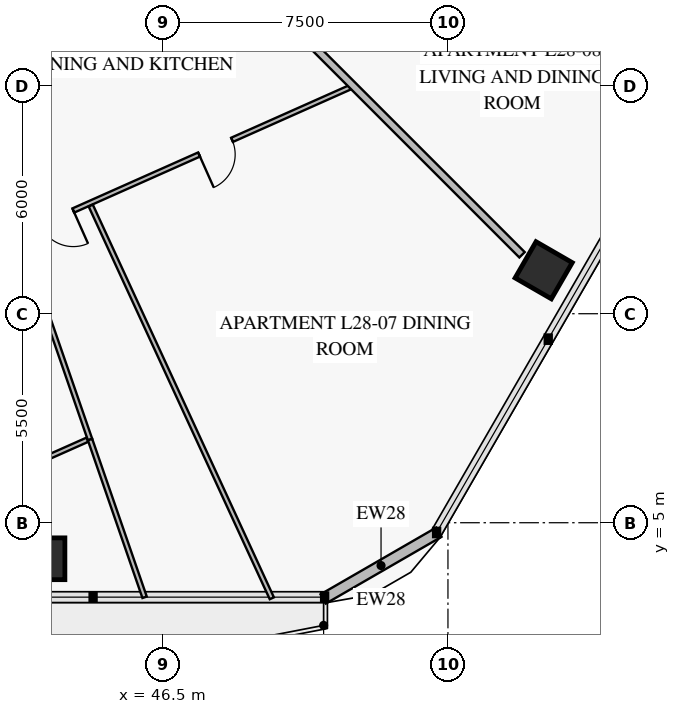
"""IFC4 building model, lengths in metres.
Left out: names, types, materials, properties, quantities, classifications, styles, units other than length and angle.
Written with IfcOpenShell. Run it as: python <this file> out.ifc"""

import sys

from ifc_helpers import new_model, si_unit, direction, frame, frame_2d, origin, origin_2d, place, context, subcontext, project, spatial, rectangle, extrude, element, fill, save


model = new_model("IFC4")
c1 = context("Model", 3, precision=1e-05, world=origin(), true_north=direction((0.0, 1.0)))
c2 = subcontext(c1, "Body", "Model", "MODEL_VIEW")
j1 = project(units=[si_unit("LENGTHUNIT", "METRE"), si_unit("PLANEANGLEUNIT", "RADIAN")], contexts=[c1])
p1 = place(None, origin())
s1 = spatial("IfcSite", under=j1, at=p1, CompositionType="ELEMENT")
p2 = place(p1, origin())
s2 = spatial("IfcBuilding", under=s1, at=p2, CompositionType="ELEMENT")
p3 = place(p2, frame((0.0, 0.0, 115.2)))
s3 = spatial("IfcBuildingStorey", under=s2, at=p3, CompositionType="ELEMENT", Elevation=115.2)
for number, where, z_axis, x_axis in (
    (1, (43.37, 4.052, 0.0), (0.0, 0.0, 1.0), (1.0, 0.0, 0.0)),
    (2, (56.519, 11.643, 0.0), (0.0, 0.0, 1.0), (0.5, 0.866, 0.0)),
):
    element("IfcColumn", number, at=place(p3, frame(where, z_axis=z_axis, x_axis=x_axis)), inside=s3, PredefinedType="COLUMN", context=c2, shape_type="SweptSolid", body=[
        extrude(rectangle(XDim=1.1, YDim=1.1, at=origin_2d()), origin(), (0.0, 0.0, 1.0), 3.55),
    ])
p4 = place(p3, frame((53.761, 4.751, 0.0), z_axis=(0.0, 0.0, 1.0), x_axis=(-0.866007452331, -0.500031091541, 0.0)))
e3 = element("IfcWall", 3, at=p4, inside=s3, PredefinedType="SOLIDWALL", context=c2, shape_type="SweptSolid", body=[
    extrude(rectangle(XDim=3.515, YDim=0.28, at=frame_2d((1.757, 0.0))), origin(), (0.0, 0.0, 1.0), 3.55),
])
p5 = place(p3, frame((42.625, 12.541, 0.0), z_axis=(0.0, 0.0, 1.0), x_axis=(0.913542487884, 0.406743313198, 0.0)))
e4 = element("IfcWall", 4, at=p5, inside=s3, PredefinedType="PARTITIONING", context=c2, shape_type="SweptSolid", body=[
    extrude(rectangle(XDim=9.624, YDim=0.12, at=frame_2d((4.812, 0.0))), origin(), (0.0, 0.0, 1.0), 3.1),
])
p6 = place(p5, frame((0.711, 0.0, 0.0)))
e5 = element("IfcOpeningElement", 5, at=p6, cuts=e4, PredefinedType="OPENING", context=c2, shape_type="SweptSolid", body=[
    extrude(rectangle(XDim=0.95, YDim=2.1, at=frame_2d((0.475, 1.05))), frame((0.0, 0.072, 0.0), z_axis=(0.0, -1.0, 0.0), x_axis=(1.0, 0.0, 0.0)), (0.0, 0.0, 1.0), 0.144),
])
p7 = place(p5, frame((5.282, 0.0, 0.0)))
e6 = element("IfcOpeningElement", 6, at=p7, cuts=e4, PredefinedType="OPENING", context=c2, shape_type="SweptSolid", body=[
    extrude(rectangle(XDim=0.95, YDim=2.1, at=frame_2d((0.475, 1.05))), frame((0.0, 0.072, 0.0), z_axis=(0.0, -1.0, 0.0), x_axis=(1.0, 0.0, 0.0)), (0.0, 0.0, 1.0), 0.144),
])
p8 = place(p3, frame((42.739, 12.517, 0.0), z_axis=(0.0, 0.0, 1.0), x_axis=(0.32689789909, -0.945059661382, 0.0)))
e7 = element("IfcWall", 7, at=p8, inside=s3, PredefinedType="PARTITIONING", context=c2, shape_type="SweptSolid", body=[
    extrude(rectangle(XDim=5.639, YDim=0.12, at=frame_2d((2.819, 0.0))), origin(), (0.0, 0.0, 1.0), 3.55),
])
p9 = place(p3, frame((37.606, 4.109, 0.0), z_axis=(0.0, 0.0, 1.0), x_axis=(0.913547663518, 0.406731688562, 0.0)))
e8 = element("IfcWall", 8, at=p9, inside=s3, PredefinedType="PARTITIONING", context=c2, shape_type="SweptSolid", body=[
    extrude(rectangle(XDim=7.56, YDim=0.12, at=frame_2d((3.78, 0.0))), origin(), (0.0, 0.0, 1.0), 2.8),
])
p10 = place(p9, frame((3.389, 0.0, 0.0)))
e9 = element("IfcOpeningElement", 9, at=p10, cuts=e8, PredefinedType="OPENING", context=c2, shape_type="SweptSolid", body=[
    extrude(rectangle(XDim=0.95, YDim=2.1, at=frame_2d((0.475, 1.05))), frame((0.0, 0.072, 0.0), z_axis=(0.0, -1.0, 0.0), x_axis=(1.0, 0.0, 0.0)), (0.0, 0.0, 1.0), 0.144),
])
p11 = place(p3, frame((44.601, 13.346, 0.0), z_axis=(0.0, 0.0, 1.0), x_axis=(0.418713944569, -0.90811818208, 0.0)))
e10 = element("IfcWall", 10, at=p11, inside=s3, PredefinedType="PARTITIONING", context=c2, shape_type="SweptSolid", body=[
    extrude(rectangle(XDim=11.38, YDim=0.12, at=frame_2d((5.69, 0.0))), origin(), (0.0, 0.0, 1.0), 2.8),
])
p12 = place(p3, frame((44.582, 7.188, 0.0), z_axis=(0.0, 0.0, 1.0), x_axis=(0.326848948983, -0.945076591896, 0.0)))
e11 = element("IfcWall", 11, at=p12, inside=s3, PredefinedType="PARTITIONING", context=c2, shape_type="SweptSolid", body=[
    extrude(rectangle(XDim=4.391, YDim=0.12, at=frame_2d((2.196, 0.0))), origin(), (0.0, 0.0, 1.0), 2.8),
])
p13 = place(p3, frame((48.04, 19.96, 0.0), z_axis=(0.0, 0.0, 1.0), x_axis=(0.707106781187, -0.707106781187, 0.0)))
e12 = element("IfcWall", 12, at=p13, inside=s3, PredefinedType="PARTITIONING", context=c2, shape_type="SweptSolid", body=[
    extrude(rectangle(XDim=11.185, YDim=0.2, at=frame_2d((5.592, 0.0))), origin(), (0.0, 0.0, 1.0), 2.85),
])
p14 = place(p3, frame((51.936, 22.356, 0.0), z_axis=(0.0, 0.0, 1.0), x_axis=(0.855542431798, -0.517732698786, 0.0)))
e13 = element("IfcWall", 13, at=p14, inside=s3, PredefinedType="PARTITIONING", context=c2, shape_type="SweptSolid", body=[
    extrude(rectangle(XDim=10.348, YDim=0.12, at=frame_2d((5.174, 0.0))), origin(), (0.0, 0.0, 1.0), 2.8),
])
p15 = place(p6, frame((0.95, 0.0, 0.0), z_axis=(0.0, 0.0, 1.0), x_axis=(-1.0, 0.0, 0.0)))
e14 = element("IfcDoor", 14, at=p15, inside=s3, OperationType="SINGLE_SWING_LEFT", PredefinedType="DOOR", context=c2, shape_type="SweptSolid", body=[
    extrude(rectangle(XDim=0.95, YDim=2.1, at=frame_2d((0.475, 1.05))), frame((0.0, 0.025, 0.0), z_axis=(0.0, -1.0, 0.0), x_axis=(1.0, 0.0, 0.0)), (0.0, 0.0, 1.0), 0.05),
])
fill(e5, e14)
p16 = place(p7, frame((0.95, 0.0, 0.0), z_axis=(0.0, 0.0, 1.0), x_axis=(-1.0, 0.0, 0.0)))
e15 = element("IfcDoor", 15, at=p16, inside=s3, OperationType="SINGLE_SWING_RIGHT", PredefinedType="DOOR", context=c2, shape_type="SweptSolid", body=[
    extrude(rectangle(XDim=0.95, YDim=2.1, at=frame_2d((0.475, 1.05))), frame((0.0, 0.025, 0.0), z_axis=(0.0, -1.0, 0.0), x_axis=(1.0, 0.0, 0.0)), (0.0, 0.0, 1.0), 0.05),
])
fill(e6, e15)
save(model, sys.argv[1])
